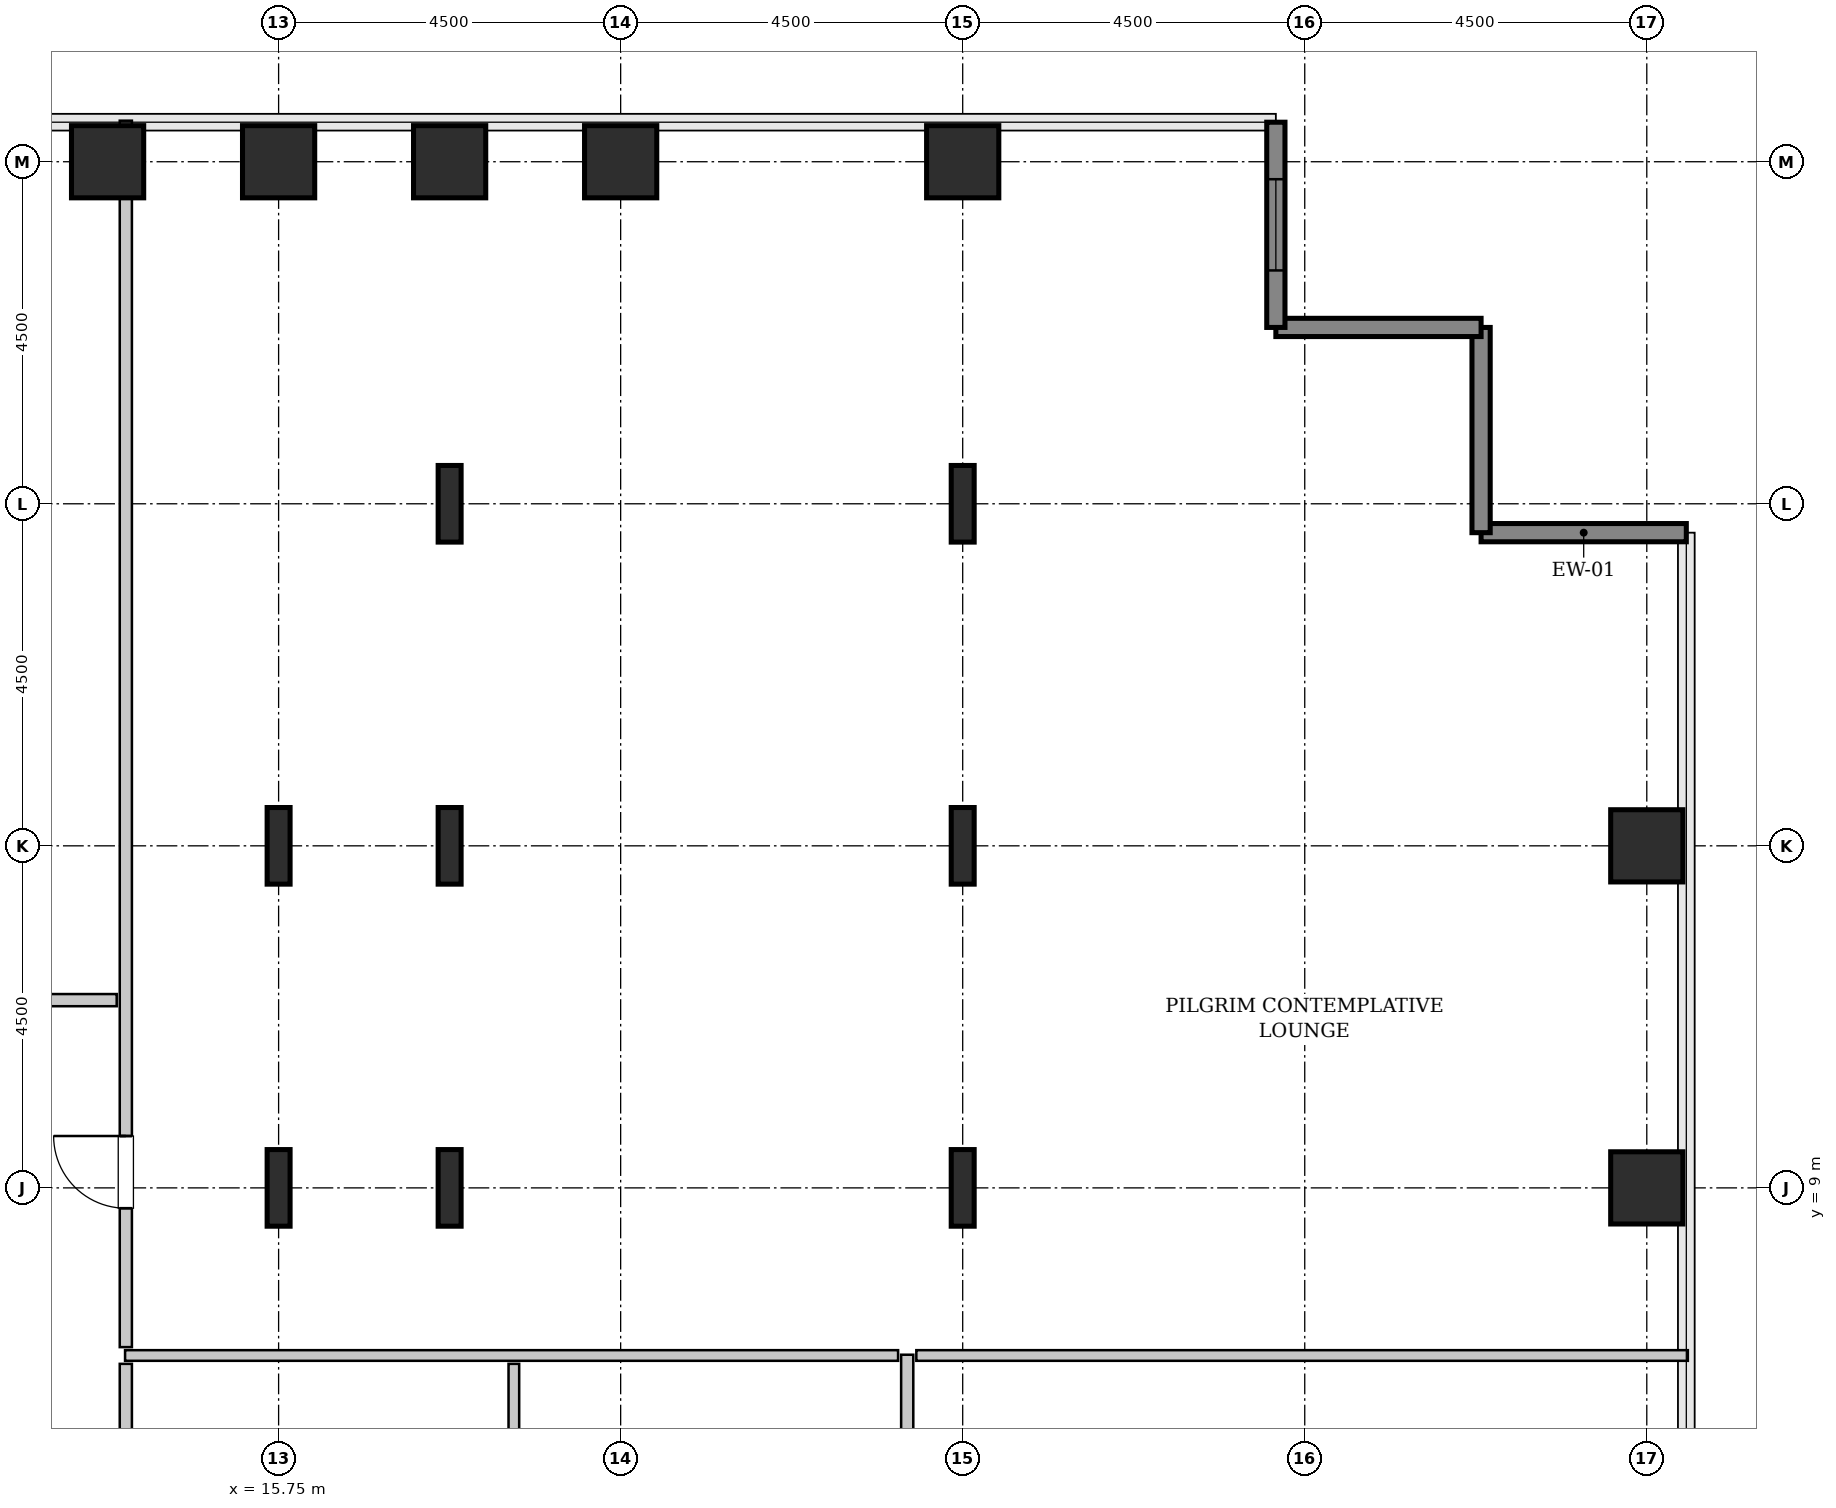
"""IFC4 building model, lengths in metres.
Left out: names, types, materials, properties, quantities, classifications, styles, units other than length and angle.
Written with IfcOpenShell. Run it as: python <this file> out.ifc"""

import sys

from ifc_helpers import new_model, si_unit, direction, frame, frame_2d, origin, origin_2d, place, context, subcontext, project, spatial, rectangle, hollow_rectangle, i_section, extrude, source, transform, mapped, element, fill, save


model = new_model("IFC4")
c1 = context("Model", 3, precision=1e-05, world=origin(), true_north=direction((0.0, 1.0)))
c2 = subcontext(c1, "Body", "Model", "MODEL_VIEW")
j1 = project(units=[si_unit("LENGTHUNIT", "METRE"), si_unit("PLANEANGLEUNIT", "RADIAN")], contexts=[c1])
p1 = place(None, origin())
s1 = spatial("IfcSite", under=j1, at=p1, CompositionType="ELEMENT")
p2 = place(p1, origin())
s2 = spatial("IfcBuilding", under=s1, at=p2, CompositionType="ELEMENT")
p3 = place(p2, frame((0.0, 0.0, 94.6)))
s3 = spatial("IfcBuildingStorey", under=s2, at=p3, CompositionType="ELEMENT", Elevation=94.6)
m1 = source(origin(), c2, "Body", "SweptSolid", [
    extrude(hollow_rectangle(XDim=0.95, YDim=0.95, WallThickness=0.045, InnerFilletRadius=0.045, OuterFilletRadius=0.09, at=origin_2d()), origin(), (0.0, 0.0, 1.0), 3.8),
])
p4 = place(p3, frame((13.5, 22.5, 0.0), z_axis=(0.0, 0.0, 1.0), x_axis=(1.0, 0.0, 0.0)))
e1 = element("IfcColumn", 1, at=p4, inside=s3, PredefinedType="COLUMN", context=c2, shape_type="MappedRepresentation", body=[
    mapped(m1, transform((0.0, 0.0, 0.0), x_axis=(1.0, 0.0, 0.0), y_axis=(0.0, 1.0, 0.0), z_axis=(0.0, 0.0, 1.0), scale=1.0)),
])
m2 = source(origin(), c2, "Body", "SweptSolid", [
    extrude(i_section(OverallWidth=0.302, OverallDepth=1.008, WebThickness=0.021, FlangeThickness=0.04, FilletRadius=0.03, at=origin_2d()), origin(), (0.0, 0.0, 1.0), 3.8),
])
for number, where, z_axis, x_axis in (
    (2, (15.75, 9.0, 0.0), (0.0, 0.0, 1.0), (1.0, 0.0, 0.0)),
    (3, (15.75, 13.5, 0.0), (0.0, 0.0, 1.0), (1.0, 0.0, 0.0)),
):
    element("IfcColumn", number, at=place(p3, frame(where, z_axis=z_axis, x_axis=x_axis)), inside=s3, PredefinedType="COLUMN", context=c2, shape_type="MappedRepresentation", body=[
        mapped(m2, transform((0.0, 0.0, 0.0), x_axis=(1.0, 0.0, 0.0), y_axis=(0.0, 1.0, 0.0), z_axis=(0.0, 0.0, 1.0), scale=1.0)),
    ])
p5 = place(p3, frame((15.75, 22.5, 0.0), z_axis=(0.0, 0.0, 1.0), x_axis=(1.0, 0.0, 0.0)))
e4 = element("IfcColumn", 4, at=p5, inside=s3, PredefinedType="COLUMN", context=c2, shape_type="MappedRepresentation", body=[
    mapped(m1, transform((0.0, 0.0, 0.0), x_axis=(1.0, 0.0, 0.0), y_axis=(0.0, 1.0, 0.0), z_axis=(0.0, 0.0, 1.0), scale=1.0)),
])
for number, where, z_axis, x_axis in (
    (5, (18.0, 9.0, 0.0), (0.0, 0.0, 1.0), (1.0, 0.0, 0.0)),
    (6, (18.0, 13.5, 0.0), (0.0, 0.0, 1.0), (1.0, 0.0, 0.0)),
    (7, (18.0, 18.0, 0.0), (0.0, 0.0, 1.0), (1.0, 0.0, 0.0)),
):
    element("IfcColumn", number, at=place(p3, frame(where, z_axis=z_axis, x_axis=x_axis)), inside=s3, PredefinedType="COLUMN", context=c2, shape_type="MappedRepresentation", body=[
        mapped(m2, transform((0.0, 0.0, 0.0), x_axis=(1.0, 0.0, 0.0), y_axis=(0.0, 1.0, 0.0), z_axis=(0.0, 0.0, 1.0), scale=1.0)),
    ])
for number, where, z_axis, x_axis in (
    (8, (18.0, 22.5, 0.0), (0.0, 0.0, 1.0), (1.0, 0.0, 0.0)),
    (9, (20.25, 22.5, 0.0), (0.0, 0.0, 1.0), (1.0, 0.0, 0.0)),
):
    element("IfcColumn", number, at=place(p3, frame(where, z_axis=z_axis, x_axis=x_axis)), inside=s3, PredefinedType="COLUMN", context=c2, shape_type="MappedRepresentation", body=[
        mapped(m1, transform((0.0, 0.0, 0.0), x_axis=(1.0, 0.0, 0.0), y_axis=(0.0, 1.0, 0.0), z_axis=(0.0, 0.0, 1.0), scale=1.0)),
    ])
for number, where, z_axis, x_axis in (
    (10, (24.75, 9.0, 0.0), (0.0, 0.0, 1.0), (1.0, 0.0, 0.0)),
    (11, (24.75, 13.5, 0.0), (0.0, 0.0, 1.0), (1.0, 0.0, 0.0)),
    (12, (24.75, 18.0, 0.0), (0.0, 0.0, 1.0), (1.0, 0.0, 0.0)),
):
    element("IfcColumn", number, at=place(p3, frame(where, z_axis=z_axis, x_axis=x_axis)), inside=s3, PredefinedType="COLUMN", context=c2, shape_type="MappedRepresentation", body=[
        mapped(m2, transform((0.0, 0.0, 0.0), x_axis=(1.0, 0.0, 0.0), y_axis=(0.0, 1.0, 0.0), z_axis=(0.0, 0.0, 1.0), scale=1.0)),
    ])
for number, where, z_axis, x_axis in (
    (13, (24.75, 22.5, 0.0), (0.0, 0.0, 1.0), (1.0, 0.0, 0.0)),
    (14, (33.75, 9.0, 0.0), (0.0, 0.0, 1.0), (1.0, 0.0, 0.0)),
    (15, (33.75, 13.5, 0.0), (0.0, 0.0, 1.0), (1.0, 0.0, 0.0)),
):
    element("IfcColumn", number, at=place(p3, frame(where, z_axis=z_axis, x_axis=x_axis)), inside=s3, PredefinedType="COLUMN", context=c2, shape_type="MappedRepresentation", body=[
        mapped(m1, transform((0.0, 0.0, 0.0), x_axis=(1.0, 0.0, 0.0), y_axis=(0.0, 1.0, 0.0), z_axis=(0.0, 0.0, 1.0), scale=1.0)),
    ])
m3 = source(origin(), c2, "Body", "SweptSolid", [
    extrude(rectangle(XDim=2.7, YDim=0.24, at=frame_2d((1.35, 0.0))), origin(), (0.0, 0.0, 1.0), 3.55),
])
for number, where, z_axis, x_axis in (
    (16, (34.27, 17.62, 0.0), (0.0, 0.0, 1.0), (-1.0, 0.0, 0.0)),
    (17, (31.57, 17.62, 0.0), (0.0, 0.0, 1.0), (0.0, 1.0, 0.0)),
    (18, (31.57, 20.32, 0.0), (0.0, 0.0, 1.0), (-1.0, 0.0, 0.0)),
):
    element("IfcWall", number, at=place(p3, frame(where, z_axis=z_axis, x_axis=x_axis)), inside=s3, PredefinedType="SHEAR", context=c2, shape_type="MappedRepresentation", body=[
        mapped(m3, transform((0.0, 0.0, 0.0), x_axis=(1.0, 0.0, 0.0), y_axis=(0.0, 1.0, 0.0), z_axis=(0.0, 0.0, 1.0), scale=1.0)),
    ])
p6 = place(p3, frame((28.87, 20.32, 0.0), z_axis=(0.0, 0.0, 1.0), x_axis=(0.0, 1.0, 0.0)))
e19 = element("IfcWall", 19, at=p6, inside=s3, PredefinedType="SHEAR", context=c2, shape_type="MappedRepresentation", body=[
    mapped(m3, transform((0.0, 0.0, 0.0), x_axis=(1.0, 0.0, 0.0), y_axis=(0.0, 1.0, 0.0), z_axis=(0.0, 0.0, 1.0), scale=1.0)),
])
p7 = place(p6, frame((0.75, 0.0, 0.85)))
e20 = element("IfcOpeningElement", 20, at=p7, cuts=e19, PredefinedType="OPENING", context=c2, shape_type="SweptSolid", body=[
    extrude(rectangle(XDim=1.2, YDim=1.8, at=frame_2d((0.6, 0.9))), frame((0.0, 0.13, 0.0), z_axis=(0.0, -1.0, 0.0), x_axis=(1.0, 0.0, 0.0)), (0.0, 0.0, 1.0), 0.26),
])
m4 = source(origin(), c2, "Body", "SweptSolid", [
    extrude(rectangle(XDim=13.5, YDim=0.16, at=frame_2d((6.75, 0.0))), origin(), (0.0, 0.0, 1.0), 3.535),
])
p8 = place(p3, frame((24.02, -6.695, 0.0), z_axis=(0.0, 0.0, 1.0), x_axis=(0.0, 1.0, 0.0)))
e21 = element("IfcWall", 21, at=p8, inside=s3, PredefinedType="PARTITIONING", context=c2, shape_type="MappedRepresentation", body=[
    mapped(m4, transform((0.0, 0.0, 0.0), x_axis=(1.0, 0.0, 0.0), y_axis=(0.0, 1.0, 0.0), z_axis=(0.0, 0.0, 1.0), scale=1.0)),
])
p9 = place(p8, frame((3.97, 0.0, 0.0)))
e22 = element("IfcOpeningElement", 22, at=p9, cuts=e21, PredefinedType="OPENING", context=c2, shape_type="SweptSolid", body=[
    extrude(rectangle(XDim=0.95, YDim=2.1, at=frame_2d((0.475, 1.05))), frame((0.0, 0.09, 0.0), z_axis=(0.0, -1.0, 0.0), x_axis=(1.0, 0.0, 0.0)), (0.0, 0.0, 1.0), 0.18),
])
m5 = source(origin(), c2, "Body", "SweptSolid", [
    extrude(rectangle(XDim=10.17, YDim=0.14, at=frame_2d((5.085, 0.0))), origin(), (0.0, 0.0, 1.0), 3.535),
])
p10 = place(p3, frame((13.73, 6.795, 0.0), z_axis=(0.0, 0.0, 1.0), x_axis=(1.0, 0.0, 0.0)))
e23 = element("IfcWall", 23, at=p10, inside=s3, PredefinedType="PARTITIONING", context=c2, shape_type="MappedRepresentation", body=[
    mapped(m5, transform((0.0, 0.0, 0.0), x_axis=(1.0, 0.0, 0.0), y_axis=(0.0, 1.0, 0.0), z_axis=(0.0, 0.0, 1.0), scale=1.0)),
])
m6 = source(origin(), c2, "Body", "SweptSolid", [
    extrude(rectangle(XDim=10.15, YDim=0.14, at=frame_2d((5.075, 0.0))), origin(), (0.0, 0.0, 1.0), 3.535),
])
p11 = place(p3, frame((24.14, 6.795, 0.0), z_axis=(0.0, 0.0, 1.0), x_axis=(1.0, 0.0, 0.0)))
e24 = element("IfcWall", 24, at=p11, inside=s3, PredefinedType="PARTITIONING", context=c2, shape_type="MappedRepresentation", body=[
    mapped(m6, transform((0.0, 0.0, 0.0), x_axis=(1.0, 0.0, 0.0), y_axis=(0.0, 1.0, 0.0), z_axis=(0.0, 0.0, 1.0), scale=1.0)),
])
m7 = source(origin(), c2, "Body", "SweptSolid", [
    extrude(rectangle(XDim=8.075, YDim=0.16, at=frame_2d((4.038, 0.0))), origin(), (0.0, 0.0, 1.0), 3.535),
])
p12 = place(p3, frame((13.74, -1.39, 0.0), z_axis=(0.0, 0.0, 1.0), x_axis=(0.0, 1.0, 0.0)))
e25 = element("IfcWall", 25, at=p12, inside=s3, PredefinedType="PARTITIONING", context=c2, shape_type="MappedRepresentation", body=[
    mapped(m7, transform((0.0, 0.0, 0.0), x_axis=(1.0, 0.0, 0.0), y_axis=(0.0, 1.0, 0.0), z_axis=(0.0, 0.0, 1.0), scale=1.0)),
])
p13 = place(p12, frame((3.562, 0.0, 0.0)))
e26 = element("IfcOpeningElement", 26, at=p13, cuts=e25, PredefinedType="OPENING", context=c2, shape_type="SweptSolid", body=[
    extrude(rectangle(XDim=0.95, YDim=2.1, at=frame_2d((0.475, 1.05))), frame((0.0, 0.09, 0.0), z_axis=(0.0, -1.0, 0.0), x_axis=(1.0, 0.0, 0.0)), (0.0, 0.0, 1.0), 0.18),
])
m8 = source(origin(), c2, "Body", "SweptSolid", [
    extrude(rectangle(XDim=7.955, YDim=0.14, at=frame_2d((3.978, 0.0))), origin(), (0.0, 0.0, 1.0), 3.535),
])
p14 = place(p3, frame((18.845, -1.27, 0.0), z_axis=(0.0, 0.0, 1.0), x_axis=(0.0, 1.0, 0.0)))
e27 = element("IfcWall", 27, at=p14, inside=s3, PredefinedType="PARTITIONING", context=c2, shape_type="MappedRepresentation", body=[
    mapped(m8, transform((0.0, 0.0, 0.0), x_axis=(1.0, 0.0, 0.0), y_axis=(0.0, 1.0, 0.0), z_axis=(0.0, 0.0, 1.0), scale=1.0)),
])
m9 = source(origin(), c2, "Body", "SweptSolid", [
    extrude(rectangle(XDim=16.135, YDim=0.16, at=frame_2d((8.067, 0.0))), origin(), (0.0, 0.0, 1.0), 3.535),
])
p15 = place(p3, frame((13.74, 6.905, 0.0), z_axis=(0.0, 0.0, 1.0), x_axis=(0.0, 1.0, 0.0)))
e28 = element("IfcWall", 28, at=p15, inside=s3, PredefinedType="PARTITIONING", context=c2, shape_type="MappedRepresentation", body=[
    mapped(m9, transform((0.0, 0.0, 0.0), x_axis=(1.0, 0.0, 0.0), y_axis=(0.0, 1.0, 0.0), z_axis=(0.0, 0.0, 1.0), scale=1.0)),
])
p16 = place(p15, frame((1.827, 0.0, 0.0)))
e29 = element("IfcOpeningElement", 29, at=p16, cuts=e28, PredefinedType="OPENING", context=c2, shape_type="SweptSolid", body=[
    extrude(rectangle(XDim=0.95, YDim=2.1, at=frame_2d((0.475, 1.05))), frame((0.0, 0.09, 0.0), z_axis=(0.0, -1.0, 0.0), x_axis=(1.0, 0.0, 0.0)), (0.0, 0.0, 1.0), 0.18),
])
m10 = source(origin(), c2, "Body", "SweptSolid", [
    extrude(rectangle(XDim=5.425, YDim=0.16, at=frame_2d((2.712, 0.0))), origin(), (0.0, 0.0, 1.0), 3.535),
])
p17 = place(p3, frame((8.195, 11.47, 0.0), z_axis=(0.0, 0.0, 1.0), x_axis=(1.0, 0.0, 0.0)))
e30 = element("IfcWall", 30, at=p17, inside=s3, PredefinedType="PARTITIONING", context=c2, shape_type="MappedRepresentation", body=[
    mapped(m10, transform((0.0, 0.0, 0.0), x_axis=(1.0, 0.0, 0.0), y_axis=(0.0, 1.0, 0.0), z_axis=(0.0, 0.0, 1.0), scale=1.0)),
])
p18 = place(p17, frame((2.238, 0.0, 0.0)))
e31 = element("IfcOpeningElement", 31, at=p18, cuts=e30, PredefinedType="OPENING", context=c2, shape_type="SweptSolid", body=[
    extrude(rectangle(XDim=0.95, YDim=2.1, at=frame_2d((0.475, 1.05))), frame((0.0, 0.09, 0.0), z_axis=(0.0, -1.0, 0.0), x_axis=(1.0, 0.0, 0.0)), (0.0, 0.0, 1.0), 0.18),
])
m11 = source(origin(), c2, "Body", "SweptSolid", [
    extrude(rectangle(XDim=1.2, YDim=1.8, at=frame_2d((0.6, 0.9))), frame((0.0, 0.03, 0.0), z_axis=(0.0, -1.0, 0.0), x_axis=(1.0, 0.0, 0.0)), (0.0, 0.0, 1.0), 0.06),
])
p19 = place(p7, origin())
e32 = element("IfcWindow", 32, at=p19, inside=s3, PartitioningType="SINGLE_PANEL", PredefinedType="WINDOW", context=c2, shape_type="MappedRepresentation", body=[
    mapped(m11, transform((0.0, 0.0, 0.0), x_axis=(1.0, 0.0, 0.0), y_axis=(0.0, 1.0, 0.0), z_axis=(0.0, 0.0, 1.0), scale=1.0)),
])
fill(e20, e32)
m12 = source(origin(), c2, "Body", "SweptSolid", [
    extrude(rectangle(XDim=0.95, YDim=2.1, at=frame_2d((0.475, 1.05))), frame((0.0, 0.025, 0.0), z_axis=(0.0, -1.0, 0.0), x_axis=(1.0, 0.0, 0.0)), (0.0, 0.0, 1.0), 0.05),
])
p20 = place(p16, origin())
e33 = element("IfcDoor", 33, at=p20, inside=s3, OperationType="SINGLE_SWING_RIGHT", PredefinedType="DOOR", context=c2, shape_type="MappedRepresentation", body=[
    mapped(m12, transform((0.0, 0.0, 0.0), x_axis=(1.0, 0.0, 0.0), y_axis=(0.0, 1.0, 0.0), z_axis=(0.0, 0.0, 1.0), scale=1.0)),
])
fill(e29, e33)
save(model, sys.argv[1])
